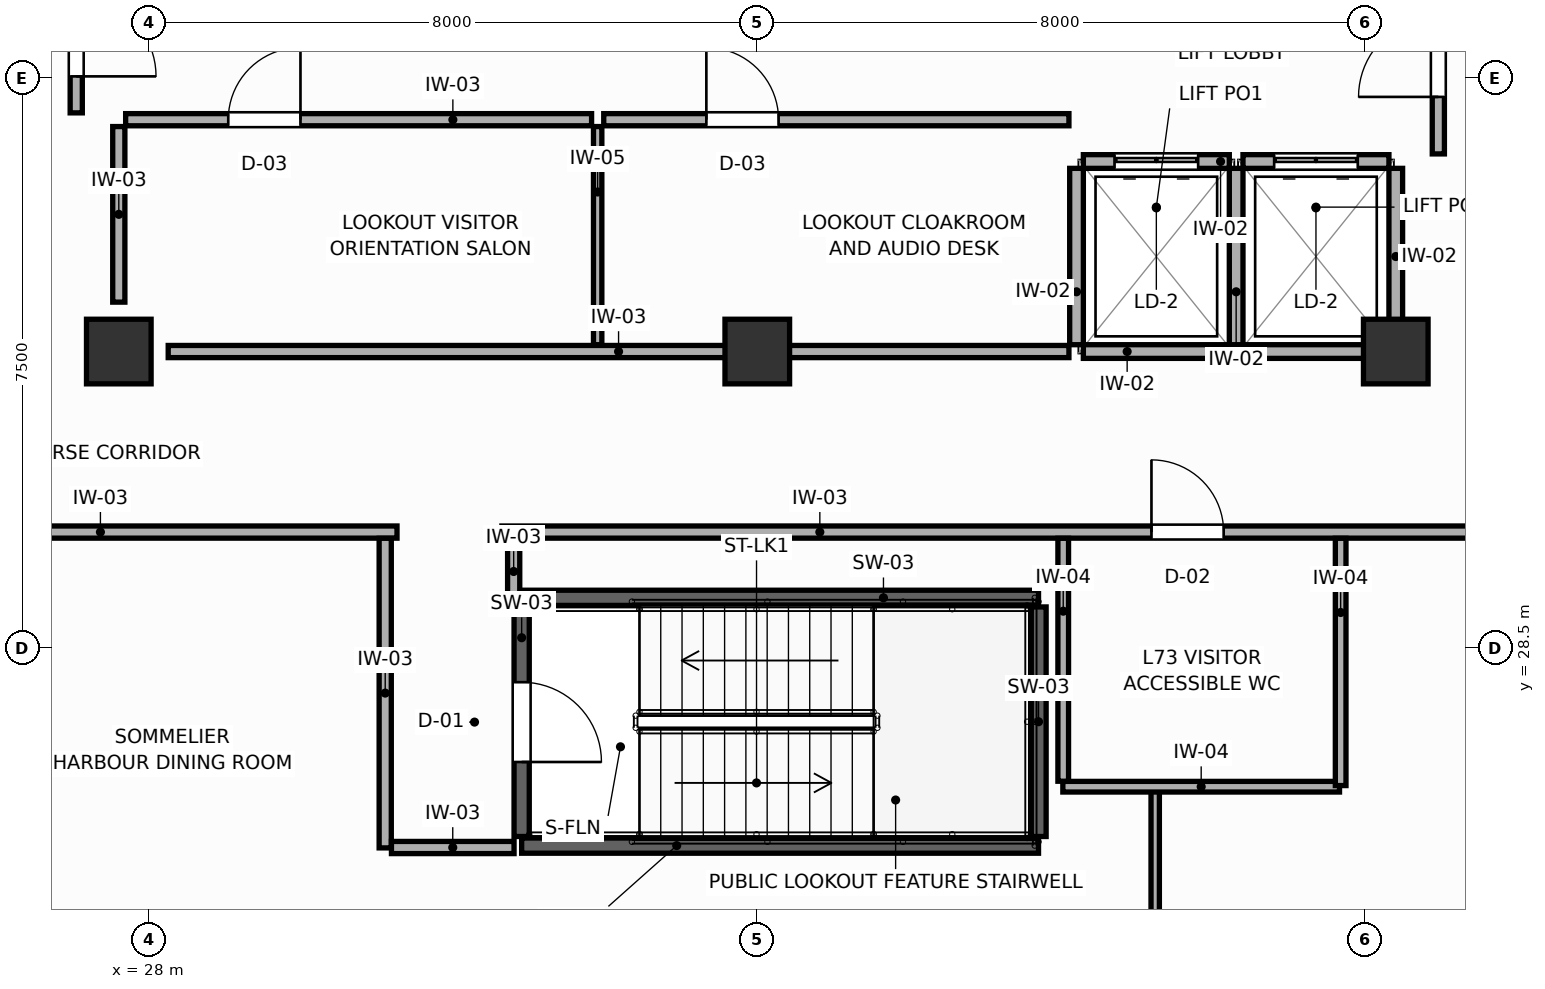
"""IFC4 building model, lengths in metres.
Left out: names, types, materials, properties, quantities, classifications, styles, units other than length and angle.
Written with IfcOpenShell. Run it as: python <this file> out.ifc"""

import sys

from ifc_helpers import new_model, si_unit, direction, frame, frame_2d, origin, origin_2d, place, context, subcontext, project, spatial, rectangle, extrude, source, transform, mapped, element, fill, save


model = new_model("IFC4")
c1 = context("Model", 3, precision=1e-05, world=origin(), true_north=direction((0.0, 1.0)))
c2 = subcontext(c1, "Body", "Model", "MODEL_VIEW")
j1 = project(units=[si_unit("LENGTHUNIT", "METRE"), si_unit("PLANEANGLEUNIT", "RADIAN")], contexts=[c1])
p1 = place(None, origin())
s1 = spatial("IfcSite", under=j1, at=p1, CompositionType="ELEMENT")
p2 = place(p1, origin())
s2 = spatial("IfcBuilding", under=s1, at=p2, CompositionType="ELEMENT")
p3 = place(p2, frame((0.0, 0.0, 279.6)))
s3 = spatial("IfcBuildingStorey", under=s2, at=p3, CompositionType="ELEMENT", Elevation=279.6)
m1 = source(origin(), c2, "Body", "SweptSolid", [
    extrude(rectangle(XDim=0.85, YDim=0.85, at=origin_2d()), origin(), (0.0, 0.0, 1.0), 4.2),
])
for number, where, z_axis, x_axis in (
    (1, (27.6, 32.4, 0.0), (0.0, 0.0, 1.0), (1.0, 0.0, 0.0)),
    (2, (44.4, 32.4, 0.0), (0.0, 0.0, 1.0), (1.0, 0.0, 0.0)),
    (3, (36.0, 32.4, 0.0), (0.0, 0.0, 1.0), (1.0, 0.0, 0.0)),
):
    element("IfcColumn", number, at=place(p3, frame(where, z_axis=z_axis, x_axis=x_axis)), inside=s3, PredefinedType="COLUMN", context=c2, shape_type="MappedRepresentation", body=[
        mapped(m1, transform((0.0, 0.0, 0.0), scale=1.0)),
    ])
for number, where, z_axis, x_axis in (
    (4, (32.9, 29.16, 0.0), (0.0, 0.0, 1.0), (1.0, 0.0, 0.0)),
    (5, (32.9, 25.9, 0.0), (0.0, 0.0, 1.0), (1.0, 0.0, 0.0)),
):
    element("IfcWall", number, at=place(p3, frame(where, z_axis=z_axis, x_axis=x_axis)), inside=s3, PredefinedType="SHEAR", context=c2, shape_type="SweptSolid", body=[
        extrude(rectangle(XDim=6.8, YDim=0.2, at=frame_2d((3.4, 0.0))), origin(), (0.0, 0.0, 1.0), 4.2),
    ])
p4 = place(p3, frame((39.7, 26.02, 0.0), z_axis=(0.0, 0.0, 1.0), x_axis=(0.0, 1.0, 0.0)))
e6 = element("IfcWall", 6, at=p4, inside=s3, PredefinedType="SHEAR", context=c2, shape_type="SweptSolid", body=[
    extrude(rectangle(XDim=3.02, YDim=0.2, at=frame_2d((1.51, 0.0))), origin(), (0.0, 0.0, 1.0), 4.2),
])
p5 = place(p3, frame((40.29, 34.9, 0.0), z_axis=(0.0, 0.0, 1.0), x_axis=(1.0, 0.0, 0.0)))
e7 = element("IfcWall", 7, at=p5, inside=s3, PredefinedType="PARTITIONING", context=c2, shape_type="SweptSolid", body=[
    extrude(rectangle(XDim=1.92, YDim=0.18, at=frame_2d((0.96, 0.0))), origin(), (0.0, 0.0, 1.0), 3.96),
])
p6 = place(p5, frame((0.41, 0.0, 0.0)))
e8 = element("IfcOpeningElement", 8, at=p6, cuts=e7, PredefinedType="OPENING", context=c2, shape_type="SweptSolid", body=[
    extrude(rectangle(XDim=1.1, YDim=2.1, at=frame_2d((0.55, 1.05))), frame((0.0, 0.1, 0.0), z_axis=(0.0, -1.0, 0.0), x_axis=(1.0, 0.0, 0.0)), (0.0, 0.0, 1.0), 0.2),
])
p7 = place(p3, frame((40.29, 32.4, 0.0), z_axis=(0.0, 0.0, 1.0), x_axis=(1.0, 0.0, 0.0)))
e9 = element("IfcWall", 9, at=p7, inside=s3, PredefinedType="PARTITIONING", context=c2, shape_type="SweptSolid", body=[
    extrude(rectangle(XDim=1.92, YDim=0.18, at=frame_2d((0.96, 0.0))), origin(), (0.0, 0.0, 1.0), 2.52),
])
p8 = place(p3, frame((40.2, 32.49, 0.0), z_axis=(0.0, 0.0, 1.0), x_axis=(0.0, 1.0, 0.0)))
e10 = element("IfcWall", 10, at=p8, inside=s3, PredefinedType="PARTITIONING", context=c2, shape_type="SweptSolid", body=[
    extrude(rectangle(XDim=2.32, YDim=0.18, at=frame_2d((1.16, 0.0))), origin(), (0.0, 0.0, 1.0), 3.96),
])
p9 = place(p3, frame((42.39, 34.9, 0.0), z_axis=(0.0, 0.0, 1.0), x_axis=(1.0, 0.0, 0.0)))
e11 = element("IfcWall", 11, at=p9, inside=s3, PredefinedType="PARTITIONING", context=c2, shape_type="SweptSolid", body=[
    extrude(rectangle(XDim=1.92, YDim=0.18, at=frame_2d((0.96, 0.0))), origin(), (0.0, 0.0, 1.0), 3.96),
])
p10 = place(p9, frame((0.41, 0.0, 0.0)))
e12 = element("IfcOpeningElement", 12, at=p10, cuts=e11, PredefinedType="OPENING", context=c2, shape_type="SweptSolid", body=[
    extrude(rectangle(XDim=1.1, YDim=2.1, at=frame_2d((0.55, 1.05))), frame((0.0, 0.1, 0.0), z_axis=(0.0, -1.0, 0.0), x_axis=(1.0, 0.0, 0.0)), (0.0, 0.0, 1.0), 0.2),
])
p11 = place(p3, frame((42.39, 32.4, 0.0), z_axis=(0.0, 0.0, 1.0), x_axis=(1.0, 0.0, 0.0)))
e13 = element("IfcWall", 13, at=p11, inside=s3, PredefinedType="PARTITIONING", context=c2, shape_type="SweptSolid", body=[
    extrude(rectangle(XDim=1.92, YDim=0.18, at=frame_2d((0.96, 0.0))), origin(), (0.0, 0.0, 1.0), 2.52),
])
for number, where, z_axis, x_axis in (
    (14, (42.3, 32.49, 0.0), (0.0, 0.0, 1.0), (0.0, 1.0, 0.0)),
    (15, (44.4, 32.49, 0.0), (0.0, 0.0, 1.0), (0.0, 1.0, 0.0)),
):
    element("IfcWall", number, at=place(p3, frame(where, z_axis=z_axis, x_axis=x_axis)), inside=s3, PredefinedType="PARTITIONING", context=c2, shape_type="SweptSolid", body=[
        extrude(rectangle(XDim=2.32, YDim=0.18, at=frame_2d((1.16, 0.0))), origin(), (0.0, 0.0, 1.0), 3.96),
    ])
p12 = place(p3, frame((28.25, 32.4, 0.0), z_axis=(0.0, 0.0, 1.0), x_axis=(1.0, 0.0, 0.0)))
e16 = element("IfcWall", 16, at=p12, inside=s3, PredefinedType="PARTITIONING", context=c2, shape_type="SweptSolid", body=[
    extrude(rectangle(XDim=11.85, YDim=0.16, at=frame_2d((5.925, 0.0))), origin(), (0.0, 0.0, 1.0), 2.52),
])
p13 = place(p3, frame((27.6, 33.05, 0.0), z_axis=(0.0, 0.0, 1.0), x_axis=(0.0, 1.0, 0.0)))
e17 = element("IfcWall", 17, at=p13, inside=s3, PredefinedType="PARTITIONING", context=c2, shape_type="SweptSolid", body=[
    extrude(rectangle(XDim=2.31, YDim=0.16, at=frame_2d((1.155, 0.0))), origin(), (0.0, 0.0, 1.0), 3.96),
])
p14 = place(p3, frame((33.9, 32.49, 0.0), z_axis=(0.0, 0.0, 1.0), x_axis=(0.0, 1.0, 0.0)))
e18 = element("IfcWall", 18, at=p14, inside=s3, PredefinedType="MOVABLE", context=c2, shape_type="SweptSolid", body=[
    extrude(rectangle(XDim=2.87, YDim=0.11, at=frame_2d((1.435, 0.0))), origin(), (0.0, 0.0, 1.0), 3.96),
])
p15 = place(p3, frame((27.69, 35.45, 0.0), z_axis=(0.0, 0.0, 1.0), x_axis=(1.0, 0.0, 0.0)))
e19 = element("IfcWall", 19, at=p15, inside=s3, PredefinedType="PARTITIONING", context=c2, shape_type="SweptSolid", body=[
    extrude(rectangle(XDim=6.13, YDim=0.16, at=frame_2d((3.065, 0.0))), origin(), (0.0, 0.0, 1.0), 3.96),
])
p16 = place(p15, frame((1.35, 0.0, 0.0)))
e20 = element("IfcOpeningElement", 20, at=p16, cuts=e19, PredefinedType="OPENING", context=c2, shape_type="SweptSolid", body=[
    extrude(rectangle(XDim=0.95, YDim=2.05, at=frame_2d((0.475, 1.025))), frame((0.0, 0.09, 0.0), z_axis=(0.0, -1.0, 0.0), x_axis=(1.0, 0.0, 0.0)), (0.0, 0.0, 1.0), 0.18),
])
p17 = place(p3, frame((33.98, 35.45, 0.0), z_axis=(0.0, 0.0, 1.0), x_axis=(1.0, 0.0, 0.0)))
e21 = element("IfcWall", 21, at=p17, inside=s3, PredefinedType="PARTITIONING", context=c2, shape_type="SweptSolid", body=[
    extrude(rectangle(XDim=6.12, YDim=0.16, at=frame_2d((3.06, 0.0))), origin(), (0.0, 0.0, 1.0), 3.96),
])
p18 = place(p17, frame((1.35, 0.0, 0.0)))
e22 = element("IfcOpeningElement", 22, at=p18, cuts=e21, PredefinedType="OPENING", context=c2, shape_type="SweptSolid", body=[
    extrude(rectangle(XDim=0.95, YDim=2.05, at=frame_2d((0.475, 1.025))), frame((0.0, 0.09, 0.0), z_axis=(0.0, -1.0, 0.0), x_axis=(1.0, 0.0, 0.0)), (0.0, 0.0, 1.0), 0.18),
])
p19 = place(p3, frame((27.04, 35.54, 0.0), z_axis=(0.0, 0.0, 1.0), x_axis=(0.0, 1.0, 0.0)))
e23 = element("IfcWall", 23, at=p19, inside=s3, PredefinedType="PARTITIONING", context=c2, shape_type="SweptSolid", body=[
    extrude(rectangle(XDim=2.11, YDim=0.16, at=frame_2d((1.055, 0.0))), origin(), (0.0, 0.0, 1.0), 3.96),
])
p20 = place(p19, frame((0.48, 0.0, 0.0)))
e24 = element("IfcOpeningElement", 24, at=p20, cuts=e23, PredefinedType="OPENING", context=c2, shape_type="SweptSolid", body=[
    extrude(rectangle(XDim=1.05, YDim=2.1, at=frame_2d((0.525, 1.05))), frame((0.0, 0.09, 0.0), z_axis=(0.0, -1.0, 0.0), x_axis=(1.0, 0.0, 0.0)), (0.0, 0.0, 1.0), 0.18),
])
p21 = place(p3, frame((44.96, 35.0, 0.0), z_axis=(0.0, 0.0, 1.0), x_axis=(0.0, 1.0, 0.0)))
e25 = element("IfcWall", 25, at=p21, inside=s3, PredefinedType="PARTITIONING", context=c2, shape_type="SweptSolid", body=[
    extrude(rectangle(XDim=2.65, YDim=0.16, at=frame_2d((1.325, 0.0))), origin(), (0.0, 0.0, 1.0), 3.96),
])
p22 = place(p21, frame((0.75, 0.0, 0.0)))
e26 = element("IfcOpeningElement", 26, at=p22, cuts=e25, PredefinedType="OPENING", context=c2, shape_type="SweptSolid", body=[
    extrude(rectangle(XDim=1.05, YDim=2.1, at=frame_2d((0.525, 1.05))), frame((0.0, 0.09, 0.0), z_axis=(0.0, -1.0, 0.0), x_axis=(1.0, 0.0, 0.0)), (0.0, 0.0, 1.0), 0.18),
])
p23 = place(p3, frame((32.9, 26.02, 0.0), z_axis=(0.0, 0.0, 1.0), x_axis=(0.0, 1.0, 0.0)))
e27 = element("IfcWall", 27, at=p23, inside=s3, PredefinedType="SHEAR", context=c2, shape_type="SweptSolid", body=[
    extrude(rectangle(XDim=3.02, YDim=0.2, at=frame_2d((1.51, 0.0))), origin(), (0.0, 0.0, 1.0), 4.2),
])
p24 = place(p23, frame((0.98, 0.0, 0.0)))
e28 = element("IfcOpeningElement", 28, at=p24, cuts=e27, PredefinedType="OPENING", context=c2, shape_type="SweptSolid", body=[
    extrude(rectangle(XDim=1.05, YDim=2.1, at=frame_2d((0.525, 1.05))), frame((0.0, 0.11, 0.0), z_axis=(0.0, -1.0, 0.0), x_axis=(1.0, 0.0, 0.0)), (0.0, 0.0, 1.0), 0.22),
])
p25 = place(p3, frame((32.64, 30.025, 0.0), z_axis=(0.0, 0.0, 1.0), x_axis=(1.0, 0.0, 0.0)))
e29 = element("IfcWall", 29, at=p25, inside=s3, PredefinedType="PARTITIONING", context=c2, shape_type="SweptSolid", body=[
    extrude(rectangle(XDim=15.921, YDim=0.16, at=frame_2d((7.96, 0.0))), origin(), (0.0, 0.0, 1.0), 3.96),
])
p26 = place(p25, frame((8.546, 0.0, 0.0)))
e30 = element("IfcOpeningElement", 30, at=p26, cuts=e29, PredefinedType="OPENING", context=c2, shape_type="SweptSolid", body=[
    extrude(rectangle(XDim=0.95, YDim=2.05, at=frame_2d((0.475, 1.025))), frame((0.0, 0.09, 0.0), z_axis=(0.0, -1.0, 0.0), x_axis=(1.0, 0.0, 0.0)), (0.0, 0.0, 1.0), 0.18),
])
p27 = place(p25, frame((13.064, 0.0, 0.0)))
e31 = element("IfcOpeningElement", 31, at=p27, cuts=e29, PredefinedType="OPENING", context=c2, shape_type="SweptSolid", body=[
    extrude(rectangle(XDim=0.95, YDim=2.05, at=frame_2d((0.475, 1.025))), frame((0.0, 0.09, 0.0), z_axis=(0.0, -1.0, 0.0), x_axis=(1.0, 0.0, 0.0)), (0.0, 0.0, 1.0), 0.18),
])
p28 = place(p3, frame((23.456, 30.025, 0.0), z_axis=(0.0, 0.0, 1.0), x_axis=(1.0, 0.0, 0.0)))
e32 = element("IfcWall", 32, at=p28, inside=s3, PredefinedType="PARTITIONING", context=c2, shape_type="SweptSolid", body=[
    extrude(rectangle(XDim=7.804, YDim=0.16, at=frame_2d((3.902, 0.0))), origin(), (0.0, 0.0, 1.0), 3.96),
])
p29 = place(p3, frame((31.105, 25.87, 0.0), z_axis=(0.0, 0.0, 1.0), x_axis=(0.0, 1.0, 0.0)))
e33 = element("IfcWall", 33, at=p29, inside=s3, PredefinedType="PARTITIONING", context=c2, shape_type="SweptSolid", body=[
    extrude(rectangle(XDim=4.073, YDim=0.16, at=frame_2d((2.037, 0.0))), origin(), (0.0, 0.0, 1.0), 3.96),
])
p30 = place(p3, frame((31.187, 25.875, 0.0), z_axis=(0.0, 0.0, 1.0), x_axis=(1.0, 0.0, 0.0)))
e34 = element("IfcWall", 34, at=p30, inside=s3, PredefinedType="PARTITIONING", context=c2, shape_type="SweptSolid", body=[
    extrude(rectangle(XDim=1.613, YDim=0.16, at=frame_2d((0.807, 0.0))), origin(), (0.0, 0.0, 1.0), 3.96),
])
p31 = place(p3, frame((32.795, 29.07, 0.0), z_axis=(0.0, 0.0, 1.0), x_axis=(0.0, 1.0, 0.0)))
e35 = element("IfcWall", 35, at=p31, inside=s3, PredefinedType="PARTITIONING", context=c2, shape_type="SweptSolid", body=[
    extrude(rectangle(XDim=0.873, YDim=0.16, at=frame_2d((0.437, 0.0))), origin(), (0.0, 0.0, 1.0), 3.96),
])
p32 = place(p3, frame((41.235, 23.077, 0.0), z_axis=(0.0, 0.0, 1.0), x_axis=(0.0, 1.0, 0.0)))
e36 = element("IfcWall", 36, at=p32, inside=s3, PredefinedType="MOVABLE", context=c2, shape_type="SweptSolid", body=[
    extrude(rectangle(XDim=3.613, YDim=0.11, at=frame_2d((1.807, 0.0))), origin(), (0.0, 0.0, 1.0), 3.96),
])
p33 = place(p3, frame((40.02, 26.675, 0.0), z_axis=(0.0, 0.0, 1.0), x_axis=(1.0, 0.0, 0.0)))
e37 = element("IfcWall", 37, at=p33, inside=s3, PredefinedType="PARTITIONING", context=c2, shape_type="SweptSolid", body=[
    extrude(rectangle(XDim=3.64, YDim=0.14, at=frame_2d((1.82, 0.0))), origin(), (0.0, 0.0, 1.0), 3.96),
])
p34 = place(p3, frame((40.025, 26.747, 0.0), z_axis=(0.0, 0.0, 1.0), x_axis=(0.0, 1.0, 0.0)))
e38 = element("IfcWall", 38, at=p34, inside=s3, PredefinedType="PARTITIONING", context=c2, shape_type="SweptSolid", body=[
    extrude(rectangle(XDim=3.196, YDim=0.14, at=frame_2d((1.598, 0.0))), origin(), (0.0, 0.0, 1.0), 3.96),
])
p35 = place(p3, frame((43.675, 26.69, 0.0), z_axis=(0.0, 0.0, 1.0), x_axis=(0.0, 1.0, 0.0)))
e39 = element("IfcWall", 39, at=p35, inside=s3, PredefinedType="PARTITIONING", context=c2, shape_type="SweptSolid", body=[
    extrude(rectangle(XDim=3.253, YDim=0.14, at=frame_2d((1.626, 0.0))), origin(), (0.0, 0.0, 1.0), 3.96),
])
p36 = place(p6, origin())
e40 = element("IfcDoor", 40, at=p36, inside=s3, OperationType="DOUBLE_DOOR_SLIDING", PredefinedType="DOOR", context=c2, shape_type="SweptSolid", body=[
    extrude(rectangle(XDim=1.1, YDim=2.1, at=frame_2d((0.55, 1.05))), frame((0.0, 0.025, 0.0), z_axis=(0.0, -1.0, 0.0), x_axis=(1.0, 0.0, 0.0)), (0.0, 0.0, 1.0), 0.05),
])
fill(e8, e40)
p37 = place(p10, origin())
e41 = element("IfcDoor", 41, at=p37, inside=s3, OperationType="DOUBLE_DOOR_SLIDING", PredefinedType="DOOR", context=c2, shape_type="SweptSolid", body=[
    extrude(rectangle(XDim=1.1, YDim=2.1, at=frame_2d((0.55, 1.05))), frame((0.0, 0.025, 0.0), z_axis=(0.0, -1.0, 0.0), x_axis=(1.0, 0.0, 0.0)), (0.0, 0.0, 1.0), 0.05),
])
fill(e12, e41)
p38 = place(p16, origin())
e42 = element("IfcDoor", 42, at=p38, inside=s3, OperationType="SINGLE_SWING_RIGHT", PredefinedType="DOOR", context=c2, shape_type="SweptSolid", body=[
    extrude(rectangle(XDim=0.95, YDim=2.05, at=frame_2d((0.475, 1.025))), frame((0.0, 0.025, 0.0), z_axis=(0.0, -1.0, 0.0), x_axis=(1.0, 0.0, 0.0)), (0.0, 0.0, 1.0), 0.05),
])
fill(e20, e42)
p39 = place(p18, origin())
e43 = element("IfcDoor", 43, at=p39, inside=s3, OperationType="SINGLE_SWING_LEFT", PredefinedType="DOOR", context=c2, shape_type="SweptSolid", body=[
    extrude(rectangle(XDim=0.95, YDim=2.05, at=frame_2d((0.475, 1.025))), frame((0.0, 0.025, 0.0), z_axis=(0.0, -1.0, 0.0), x_axis=(1.0, 0.0, 0.0)), (0.0, 0.0, 1.0), 0.05),
])
fill(e22, e43)
p40 = place(p20, frame((1.05, 0.0, 0.0), z_axis=(0.0, 0.0, 1.0), x_axis=(-1.0, 0.0, 0.0)))
e44 = element("IfcDoor", 44, at=p40, inside=s3, OperationType="SINGLE_SWING_RIGHT", PredefinedType="DOOR", context=c2, shape_type="SweptSolid", body=[
    extrude(rectangle(XDim=1.05, YDim=2.1, at=frame_2d((0.525, 1.05))), frame((0.0, 0.025, 0.0), z_axis=(0.0, -1.0, 0.0), x_axis=(1.0, 0.0, 0.0)), (0.0, 0.0, 1.0), 0.05),
])
fill(e24, e44)
p41 = place(p22, origin())
e45 = element("IfcDoor", 45, at=p41, inside=s3, OperationType="SINGLE_SWING_LEFT", PredefinedType="DOOR", context=c2, shape_type="SweptSolid", body=[
    extrude(rectangle(XDim=1.05, YDim=2.1, at=frame_2d((0.525, 1.05))), frame((0.0, 0.025, 0.0), z_axis=(0.0, -1.0, 0.0), x_axis=(1.0, 0.0, 0.0)), (0.0, 0.0, 1.0), 0.05),
])
fill(e26, e45)
p42 = place(p24, frame((1.05, 0.0, 0.0), z_axis=(0.0, 0.0, 1.0), x_axis=(-1.0, 0.0, 0.0)))
e46 = element("IfcDoor", 46, at=p42, inside=s3, OperationType="SINGLE_SWING_RIGHT", PredefinedType="DOOR", context=c2, shape_type="SweptSolid", body=[
    extrude(rectangle(XDim=1.05, YDim=2.1, at=frame_2d((0.525, 1.05))), frame((0.0, 0.025, 0.0), z_axis=(0.0, -1.0, 0.0), x_axis=(1.0, 0.0, 0.0)), (0.0, 0.0, 1.0), 0.05),
])
fill(e28, e46)
p43 = place(p26, origin())
e47 = element("IfcDoor", 47, at=p43, inside=s3, OperationType="SINGLE_SWING_LEFT", PredefinedType="DOOR", context=c2, shape_type="SweptSolid", body=[
    extrude(rectangle(XDim=0.95, YDim=2.05, at=frame_2d((0.475, 1.025))), frame((0.0, 0.025, 0.0), z_axis=(0.0, -1.0, 0.0), x_axis=(1.0, 0.0, 0.0)), (0.0, 0.0, 1.0), 0.05),
])
fill(e30, e47)
save(model, sys.argv[1])
